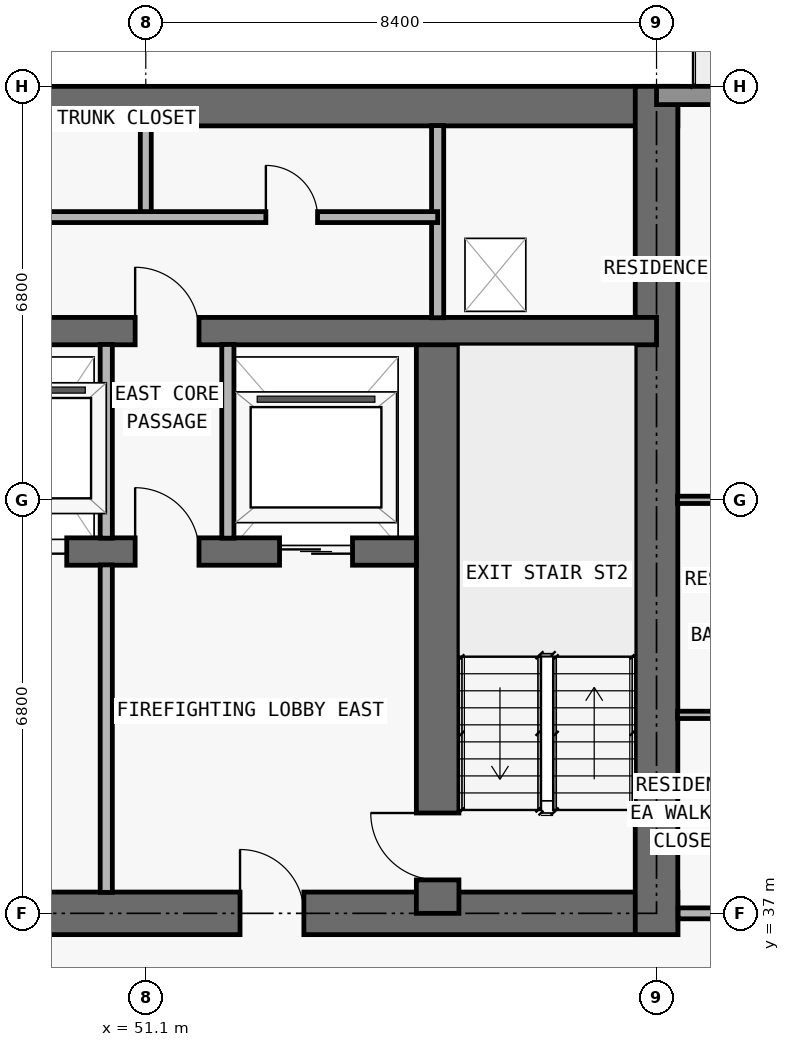
"""IFC4 building model, lengths in metres.
Left out: names, types, materials, properties, quantities, classifications, styles, units other than length and angle.
Written with IfcOpenShell. Run it as: python <this file> out.ifc"""

import sys

from ifc_helpers import new_model, si_unit, direction, frame, frame_2d, origin, place, context, subcontext, project, spatial, rectangle, extrude, element, fill, save


model = new_model("IFC4")
c1 = context("Model", 3, precision=1e-05, world=origin(), true_north=direction((0.0, 1.0)))
c2 = subcontext(c1, "Body", "Model", "MODEL_VIEW")
j1 = project(units=[si_unit("LENGTHUNIT", "METRE"), si_unit("PLANEANGLEUNIT", "RADIAN")], contexts=[c1])
p1 = place(None, origin())
s1 = spatial("IfcSite", under=j1, at=p1, CompositionType="ELEMENT")
p2 = place(p1, origin())
s2 = spatial("IfcBuilding", under=s1, at=p2, CompositionType="ELEMENT")
p3 = place(p2, frame((0.0, 0.0, 188.4)))
s3 = spatial("IfcBuildingStorey", under=s2, at=p3, CompositionType="ELEMENT", Elevation=188.4)
p4 = place(p3, frame((17.95, 37.0, 0.0), z_axis=(0.0, 0.0, 1.0), x_axis=(1.0, 0.0, 0.0)))
e1 = element("IfcWall", 1, at=p4, inside=s3, PredefinedType="SHEAR", context=c2, shape_type="SweptSolid", body=[
    extrude(rectangle(XDim=41.9, YDim=0.7, at=frame_2d((20.95, 0.0))), origin(), (0.0, 0.0, 1.0), 3.05),
])
p5 = place(p4, frame((14.35, 0.0, 0.0)))
e2 = element("IfcOpeningElement", 2, at=p5, cuts=e1, PredefinedType="OPENING", context=c2, shape_type="SweptSolid", body=[
    extrude(rectangle(XDim=1.1, YDim=2.15, at=frame_2d((0.55, 1.075))), frame((0.0, 0.36, 0.0), z_axis=(0.0, -1.0, 0.0), x_axis=(1.0, 0.0, 0.0)), (0.0, 0.0, 1.0), 0.72),
])
p6 = place(p4, frame((6.2, 0.0, 0.0)))
e3 = element("IfcOpeningElement", 3, at=p6, cuts=e1, PredefinedType="OPENING", context=c2, shape_type="SweptSolid", body=[
    extrude(rectangle(XDim=1.05, YDim=2.15, at=frame_2d((0.525, 1.075))), frame((0.0, 0.36, 0.0), z_axis=(0.0, -1.0, 0.0), x_axis=(1.0, 0.0, 0.0)), (0.0, 0.0, 1.0), 0.72),
])
p7 = place(p4, frame((34.7, 0.0, 0.0)))
e4 = element("IfcOpeningElement", 4, at=p7, cuts=e1, PredefinedType="OPENING", context=c2, shape_type="SweptSolid", body=[
    extrude(rectangle(XDim=1.05, YDim=2.15, at=frame_2d((0.525, 1.075))), frame((0.0, 0.36, 0.0), z_axis=(0.0, -1.0, 0.0), x_axis=(1.0, 0.0, 0.0)), (0.0, 0.0, 1.0), 0.72),
])
p8 = place(p4, frame((10.812, 0.0, 0.0)))
e5 = element("IfcOpeningElement", 5, at=p8, cuts=e1, PredefinedType="OPENING", context=c2, shape_type="SweptSolid", body=[
    extrude(rectangle(XDim=1.05, YDim=2.15, at=frame_2d((0.525, 1.075))), frame((0.0, 0.36, 0.0), z_axis=(0.0, -1.0, 0.0), x_axis=(1.0, 0.0, 0.0)), (0.0, 0.0, 1.0), 0.72),
])
p9 = place(p4, frame((24.05, 0.0, 0.0)))
e6 = element("IfcOpeningElement", 6, at=p9, cuts=e1, PredefinedType="OPENING", context=c2, shape_type="SweptSolid", body=[
    extrude(rectangle(XDim=1.05, YDim=2.15, at=frame_2d((0.525, 1.075))), frame((0.0, 0.36, 0.0), z_axis=(0.0, -1.0, 0.0), x_axis=(1.0, 0.0, 0.0)), (0.0, 0.0, 1.0), 0.72),
])
p10 = place(p3, frame((17.95, 50.275, 0.0), z_axis=(0.0, 0.0, 1.0), x_axis=(1.0, 0.0, 0.0)))
e7 = element("IfcWall", 7, at=p10, inside=s3, PredefinedType="SHEAR", context=c2, shape_type="SweptSolid", body=[
    extrude(rectangle(XDim=41.9, YDim=0.65, at=frame_2d((20.95, 0.0))), origin(), (0.0, 0.0, 1.0), 3.05),
])
p11 = place(p3, frame((59.5, 36.65, 0.0), z_axis=(0.0, 0.0, 1.0), x_axis=(0.0, 1.0, 0.0)))
e8 = element("IfcWall", 8, at=p11, inside=s3, PredefinedType="SHEAR", context=c2, shape_type="SweptSolid", body=[
    extrude(rectangle(XDim=13.95, YDim=0.7, at=frame_2d((6.975, 0.0))), origin(), (0.0, 0.0, 1.0), 3.05),
])
p12 = place(p3, frame((55.9, 37.0, 0.0), z_axis=(0.0, 0.0, 1.0), x_axis=(0.0, 1.0, 0.0)))
e9 = element("IfcWall", 9, at=p12, inside=s3, PredefinedType="SHEAR", context=c2, shape_type="SweptSolid", body=[
    extrude(rectangle(XDim=9.575, YDim=0.7, at=frame_2d((4.788, 0.0))), origin(), (0.0, 0.0, 1.0), 3.05),
])
p13 = place(p12, frame((0.55, 0.0, 0.0)))
e10 = element("IfcOpeningElement", 10, at=p13, cuts=e9, PredefinedType="OPENING", context=c2, shape_type="SweptSolid", body=[
    extrude(rectangle(XDim=1.1, YDim=2.15, at=frame_2d((0.55, 1.075))), frame((0.0, 0.36, 0.0), z_axis=(0.0, -1.0, 0.0), x_axis=(1.0, 0.0, 0.0)), (0.0, 0.0, 1.0), 0.72),
])
p14 = place(p3, frame((22.25, 42.95, 0.0), z_axis=(0.0, 0.0, 1.0), x_axis=(1.0, 0.0, 0.0)))
e11 = element("IfcWall", 11, at=p14, inside=s3, PredefinedType="SHEAR", context=c2, shape_type="SweptSolid", body=[
    extrude(rectangle(XDim=33.3, YDim=0.45, at=frame_2d((16.65, 0.0))), origin(), (0.0, 0.0, 1.0), 3.05),
])
p15 = place(p14, frame((1.05, 0.0, 0.0)))
e12 = element("IfcOpeningElement", 12, at=p15, cuts=e11, PredefinedType="OPENING", context=c2, shape_type="SweptSolid", body=[
    extrude(rectangle(XDim=1.2, YDim=2.2, at=frame_2d((0.6, 1.1))), frame((0.0, 0.235, 0.0), z_axis=(0.0, -1.0, 0.0), x_axis=(1.0, 0.0, 0.0)), (0.0, 0.0, 1.0), 0.47),
])
p16 = place(p14, frame((31.05, 0.0, 0.0)))
e13 = element("IfcOpeningElement", 13, at=p16, cuts=e11, PredefinedType="OPENING", context=c2, shape_type="SweptSolid", body=[
    extrude(rectangle(XDim=1.2, YDim=2.2, at=frame_2d((0.6, 1.1))), frame((0.0, 0.235, 0.0), z_axis=(0.0, -1.0, 0.0), x_axis=(1.0, 0.0, 0.0)), (0.0, 0.0, 1.0), 0.47),
])
p17 = place(p14, frame((26.45, 0.0, 0.0)))
e14 = element("IfcOpeningElement", 14, at=p17, cuts=e11, PredefinedType="OPENING", context=c2, shape_type="SweptSolid", body=[
    extrude(rectangle(XDim=1.1, YDim=2.2, at=frame_2d((0.55, 1.1))), frame((0.0, 0.235, 0.0), z_axis=(0.0, -1.0, 0.0), x_axis=(1.0, 0.0, 0.0)), (0.0, 0.0, 1.0), 0.47),
])
p18 = place(p14, frame((5.95, 0.0, 0.0)))
e15 = element("IfcOpeningElement", 15, at=p18, cuts=e11, PredefinedType="OPENING", context=c2, shape_type="SweptSolid", body=[
    extrude(rectangle(XDim=1.1, YDim=2.2, at=frame_2d((0.55, 1.1))), frame((0.0, 0.235, 0.0), z_axis=(0.0, -1.0, 0.0), x_axis=(1.0, 0.0, 0.0)), (0.0, 0.0, 1.0), 0.47),
])
p19 = place(p14, frame((3.625, 0.0, 0.0)))
e16 = element("IfcOpeningElement", 16, at=p19, cuts=e11, PredefinedType="OPENING", context=c2, shape_type="SweptSolid", body=[
    extrude(rectangle(XDim=1.05, YDim=2.15, at=frame_2d((0.525, 1.075))), frame((0.0, 0.235, 0.0), z_axis=(0.0, -1.0, 0.0), x_axis=(1.0, 0.0, 0.0)), (0.0, 0.0, 1.0), 0.47),
])
p20 = place(p14, frame((28.675, 0.0, 0.0)))
e17 = element("IfcOpeningElement", 17, at=p20, cuts=e11, PredefinedType="OPENING", context=c2, shape_type="SweptSolid", body=[
    extrude(rectangle(XDim=1.05, YDim=2.15, at=frame_2d((0.525, 1.075))), frame((0.0, 0.235, 0.0), z_axis=(0.0, -1.0, 0.0), x_axis=(1.0, 0.0, 0.0)), (0.0, 0.0, 1.0), 0.47),
])
p21 = place(p14, frame((15.225, 0.0, 0.0)))
e18 = element("IfcOpeningElement", 18, at=p21, cuts=e11, PredefinedType="OPENING", context=c2, shape_type="SweptSolid", body=[
    extrude(rectangle(XDim=1.0, YDim=2.2, at=frame_2d((0.5, 1.1))), frame((0.0, 0.235, 0.0), z_axis=(0.0, -1.0, 0.0), x_axis=(1.0, 0.0, 0.0)), (0.0, 0.0, 1.0), 0.47),
])
p22 = place(p14, frame((21.975, 0.0, 0.0)))
e19 = element("IfcOpeningElement", 19, at=p22, cuts=e11, PredefinedType="OPENING", context=c2, shape_type="SweptSolid", body=[
    extrude(rectangle(XDim=1.0, YDim=2.2, at=frame_2d((0.5, 1.1))), frame((0.0, 0.235, 0.0), z_axis=(0.0, -1.0, 0.0), x_axis=(1.0, 0.0, 0.0)), (0.0, 0.0, 1.0), 0.47),
])
p23 = place(p3, frame((18.3, 46.575, 0.0), z_axis=(0.0, 0.0, 1.0), x_axis=(1.0, 0.0, 0.0)))
e20 = element("IfcWall", 20, at=p23, inside=s3, PredefinedType="SHEAR", context=c2, shape_type="SweptSolid", body=[
    extrude(rectangle(XDim=41.2, YDim=0.45, at=frame_2d((20.6, 0.0))), origin(), (0.0, 0.0, 1.0), 3.05),
])
p24 = place(p23, frame((7.575, 0.0, 0.0)))
e21 = element("IfcOpeningElement", 21, at=p24, cuts=e20, PredefinedType="OPENING", context=c2, shape_type="SweptSolid", body=[
    extrude(rectangle(XDim=1.05, YDim=2.15, at=frame_2d((0.525, 1.075))), frame((0.0, 0.235, 0.0), z_axis=(0.0, -1.0, 0.0), x_axis=(1.0, 0.0, 0.0)), (0.0, 0.0, 1.0), 0.47),
])
p25 = place(p23, frame((32.625, 0.0, 0.0)))
e22 = element("IfcOpeningElement", 22, at=p25, cuts=e20, PredefinedType="OPENING", context=c2, shape_type="SweptSolid", body=[
    extrude(rectangle(XDim=1.05, YDim=2.15, at=frame_2d((0.525, 1.075))), frame((0.0, 0.235, 0.0), z_axis=(0.0, -1.0, 0.0), x_axis=(1.0, 0.0, 0.0)), (0.0, 0.0, 1.0), 0.47),
])
p26 = place(p3, frame((59.5, 50.45, 0.0), z_axis=(0.0, 0.0, 1.0), x_axis=(1.0, 0.0, 0.0)))
e23 = element("IfcWall", 23, at=p26, inside=s3, PredefinedType="STANDARD", context=c2, shape_type="SweptSolid", body=[
    extrude(rectangle(XDim=8.2, YDim=0.3, at=frame_2d((4.1, 0.0))), origin(), (0.0, 0.0, 1.0), 3.05),
])
p27 = place(p26, frame((3.1, 0.0, 0.0)))
e24 = element("IfcOpeningElement", 24, at=p27, cuts=e23, PredefinedType="OPENING", context=c2, shape_type="SweptSolid", body=[
    extrude(rectangle(XDim=2.0, YDim=2.3, at=frame_2d((1.0, 1.15))), frame((0.0, 0.16, 0.0), z_axis=(0.0, -1.0, 0.0), x_axis=(1.0, 0.0, 0.0)), (0.0, 0.0, 1.0), 0.32),
])
p28 = place(p3, frame((50.45, 37.345, 0.0), z_axis=(0.0, 0.0, 1.0), x_axis=(0.0, 1.0, 0.0)))
e25 = element("IfcWall", 25, at=p28, inside=s3, PredefinedType="PARTITIONING", context=c2, shape_type="SweptSolid", body=[
    extrude(rectangle(XDim=5.385, YDim=0.2, at=frame_2d((2.692, 0.0))), origin(), (0.0, 0.0, 1.0), 3.05),
])
p29 = place(p3, frame((50.45, 43.17, 0.0), z_axis=(0.0, 0.0, 1.0), x_axis=(0.0, 1.0, 0.0)))
e26 = element("IfcWall", 26, at=p29, inside=s3, PredefinedType="PARTITIONING", context=c2, shape_type="SweptSolid", body=[
    extrude(rectangle(XDim=3.185, YDim=0.2, at=frame_2d((1.593, 0.0))), origin(), (0.0, 0.0, 1.0), 3.05),
])
p30 = place(p3, frame((51.1, 48.45, 0.0), z_axis=(0.0, 0.0, 1.0), x_axis=(0.0, 1.0, 0.0)))
e27 = element("IfcWall", 27, at=p30, inside=s3, PredefinedType="PARTITIONING", context=c2, shape_type="SweptSolid", body=[
    extrude(rectangle(XDim=1.505, YDim=0.18, at=frame_2d((0.752, 0.0))), origin(), (0.0, 0.0, 1.0), 3.05),
])
p31 = place(p3, frame((52.45, 43.17, 0.0), z_axis=(0.0, 0.0, 1.0), x_axis=(0.0, 1.0, 0.0)))
e28 = element("IfcWall", 28, at=p31, inside=s3, PredefinedType="PARTITIONING", context=c2, shape_type="SweptSolid", body=[
    extrude(rectangle(XDim=3.185, YDim=0.2, at=frame_2d((1.593, 0.0))), origin(), (0.0, 0.0, 1.0), 3.05),
])
p32 = place(p3, frame((55.9, 46.795, 0.0), z_axis=(0.0, 0.0, 1.0), x_axis=(0.0, 1.0, 0.0)))
e29 = element("IfcWall", 29, at=p32, inside=s3, PredefinedType="PARTITIONING", context=c2, shape_type="SweptSolid", body=[
    extrude(rectangle(XDim=3.16, YDim=0.2, at=frame_2d((1.58, 0.0))), origin(), (0.0, 0.0, 1.0), 3.05),
])
p33 = place(p3, frame((59.855, 37.0, 0.0), z_axis=(0.0, 0.0, 1.0), x_axis=(1.0, 0.0, 0.0)))
e30 = element("IfcWall", 30, at=p33, inside=s3, PredefinedType="PARTITIONING", context=c2, shape_type="SweptSolid", body=[
    extrude(rectangle(XDim=7.845, YDim=0.18, at=frame_2d((3.922, 0.0))), origin(), (0.0, 0.0, 1.0), 3.05),
])
p34 = place(p33, frame((3.349, 0.0, 0.0)))
e31 = element("IfcOpeningElement", 31, at=p34, cuts=e30, PredefinedType="OPENING", context=c2, shape_type="SweptSolid", body=[
    extrude(rectangle(XDim=1.0, YDim=2.2, at=frame_2d((0.5, 1.1))), frame((0.0, 0.1, 0.0), z_axis=(0.0, -1.0, 0.0), x_axis=(1.0, 0.0, 0.0)), (0.0, 0.0, 1.0), 0.2),
])
p35 = place(p3, frame((59.845, 40.264, 0.0), z_axis=(0.0, 0.0, 1.0), x_axis=(1.0, 0.0, 0.0)))
e32 = element("IfcWall", 32, at=p35, inside=s3, PredefinedType="PARTITIONING", context=c2, shape_type="SweptSolid", body=[
    extrude(rectangle(XDim=2.305, YDim=0.12, at=frame_2d((1.152, 0.0))), origin(), (0.0, 0.0, 1.0), 3.05),
])
p36 = place(p3, frame((59.845, 43.8, 0.0), z_axis=(0.0, 0.0, 1.0), x_axis=(1.0, 0.0, 0.0)))
e33 = element("IfcWall", 33, at=p36, inside=s3, PredefinedType="PARTITIONING", context=c2, shape_type="SweptSolid", body=[
    extrude(rectangle(XDim=11.56, YDim=0.12, at=frame_2d((5.78, 0.0))), origin(), (0.0, 0.0, 1.0), 2.418),
])
p37 = place(p36, frame((3.409, 0.0, 0.0)))
e34 = element("IfcOpeningElement", 34, at=p37, cuts=e33, PredefinedType="OPENING", context=c2, shape_type="SweptSolid", body=[
    extrude(rectangle(XDim=0.9, YDim=2.15, at=frame_2d((0.45, 1.075))), frame((0.0, 0.07, 0.0), z_axis=(0.0, -1.0, 0.0), x_axis=(1.0, 0.0, 0.0)), (0.0, 0.0, 1.0), 0.14),
])
p38 = place(p36, frame((0.728, 0.0, 0.0)))
e35 = element("IfcOpeningElement", 35, at=p38, cuts=e33, PredefinedType="OPENING", context=c2, shape_type="SweptSolid", body=[
    extrude(rectangle(XDim=0.85, YDim=2.1, at=frame_2d((0.425, 1.05))), frame((0.0, 0.07, 0.0), z_axis=(0.0, -1.0, 0.0), x_axis=(1.0, 0.0, 0.0)), (0.0, 0.0, 1.0), 0.14),
])
p39 = place(p3, frame((31.4, 48.45, 0.0), z_axis=(0.0, 0.0, 1.0), x_axis=(1.0, 0.0, 0.0)))
e36 = element("IfcWall", 36, at=p39, inside=s3, PredefinedType="PARTITIONING", context=c2, shape_type="SweptSolid", body=[
    extrude(rectangle(XDim=24.5, YDim=0.18, at=frame_2d((12.25, 0.0))), origin(), (0.0, 0.0, 1.0), 3.05),
])
p40 = place(p39, frame((1.775, 0.0, 0.0)))
e37 = element("IfcOpeningElement", 37, at=p40, cuts=e36, PredefinedType="OPENING", context=c2, shape_type="SweptSolid", body=[
    extrude(rectangle(XDim=1.2, YDim=2.2, at=frame_2d((0.6, 1.1))), frame((0.0, 0.1, 0.0), z_axis=(0.0, -1.0, 0.0), x_axis=(1.0, 0.0, 0.0)), (0.0, 0.0, 1.0), 0.2),
])
p41 = place(p39, frame((9.35, 0.0, 0.0)))
e38 = element("IfcOpeningElement", 38, at=p41, cuts=e36, PredefinedType="OPENING", context=c2, shape_type="SweptSolid", body=[
    extrude(rectangle(XDim=1.0, YDim=2.2, at=frame_2d((0.5, 1.1))), frame((0.0, 0.1, 0.0), z_axis=(0.0, -1.0, 0.0), x_axis=(1.0, 0.0, 0.0)), (0.0, 0.0, 1.0), 0.2),
])
p42 = place(p39, frame((16.725, 0.0, 0.0)))
e39 = element("IfcOpeningElement", 39, at=p42, cuts=e36, PredefinedType="OPENING", context=c2, shape_type="SweptSolid", body=[
    extrude(rectangle(XDim=1.2, YDim=2.2, at=frame_2d((0.6, 1.1))), frame((0.0, 0.1, 0.0), z_axis=(0.0, -1.0, 0.0), x_axis=(1.0, 0.0, 0.0)), (0.0, 0.0, 1.0), 0.2),
])
p43 = place(p39, frame((21.675, 0.0, 0.0)))
e40 = element("IfcOpeningElement", 40, at=p43, cuts=e36, PredefinedType="OPENING", context=c2, shape_type="SweptSolid", body=[
    extrude(rectangle(XDim=0.85, YDim=2.1, at=frame_2d((0.425, 1.05))), frame((0.0, 0.1, 0.0), z_axis=(0.0, -1.0, 0.0), x_axis=(1.0, 0.0, 0.0)), (0.0, 0.0, 1.0), 0.2),
])
p44 = place(p16, origin())
e41 = element("IfcDoor", 41, at=p44, inside=s3, OperationType="DOUBLE_DOOR_SLIDING", PredefinedType="DOOR", context=c2, shape_type="SweptSolid", body=[
    extrude(rectangle(XDim=1.2, YDim=2.2, at=frame_2d((0.6, 1.1))), frame((0.0, 0.025, 0.0), z_axis=(0.0, -1.0, 0.0), x_axis=(1.0, 0.0, 0.0)), (0.0, 0.0, 1.0), 0.05),
])
fill(e13, e41)
p45 = place(p17, origin())
e42 = element("IfcDoor", 42, at=p45, inside=s3, OperationType="DOUBLE_DOOR_SLIDING", PredefinedType="DOOR", context=c2, shape_type="SweptSolid", body=[
    extrude(rectangle(XDim=1.1, YDim=2.2, at=frame_2d((0.55, 1.1))), frame((0.0, 0.025, 0.0), z_axis=(0.0, -1.0, 0.0), x_axis=(1.0, 0.0, 0.0)), (0.0, 0.0, 1.0), 0.05),
])
fill(e14, e42)
p46 = place(p7, origin())
e43 = element("IfcDoor", 43, at=p46, inside=s3, OperationType="SINGLE_SWING_LEFT", PredefinedType="DOOR", context=c2, shape_type="SweptSolid", body=[
    extrude(rectangle(XDim=1.05, YDim=2.15, at=frame_2d((0.525, 1.075))), frame((0.0, 0.025, 0.0), z_axis=(0.0, -1.0, 0.0), x_axis=(1.0, 0.0, 0.0)), (0.0, 0.0, 1.0), 0.05),
])
fill(e4, e43)
p47 = place(p13, origin())
e44 = element("IfcDoor", 44, at=p47, inside=s3, OperationType="SINGLE_SWING_RIGHT", PredefinedType="DOOR", context=c2, shape_type="SweptSolid", body=[
    extrude(rectangle(XDim=1.1, YDim=2.15, at=frame_2d((0.55, 1.075))), frame((0.0, 0.025, 0.0), z_axis=(0.0, -1.0, 0.0), x_axis=(1.0, 0.0, 0.0)), (0.0, 0.0, 1.0), 0.05),
])
fill(e10, e44)
p48 = place(p20, origin())
e45 = element("IfcDoor", 45, at=p48, inside=s3, OperationType="SINGLE_SWING_LEFT", PredefinedType="DOOR", context=c2, shape_type="SweptSolid", body=[
    extrude(rectangle(XDim=1.05, YDim=2.15, at=frame_2d((0.525, 1.075))), frame((0.0, 0.025, 0.0), z_axis=(0.0, -1.0, 0.0), x_axis=(1.0, 0.0, 0.0)), (0.0, 0.0, 1.0), 0.05),
])
fill(e17, e45)
p49 = place(p25, origin())
e46 = element("IfcDoor", 46, at=p49, inside=s3, OperationType="SINGLE_SWING_LEFT", PredefinedType="DOOR", context=c2, shape_type="SweptSolid", body=[
    extrude(rectangle(XDim=1.05, YDim=2.15, at=frame_2d((0.525, 1.075))), frame((0.0, 0.025, 0.0), z_axis=(0.0, -1.0, 0.0), x_axis=(1.0, 0.0, 0.0)), (0.0, 0.0, 1.0), 0.05),
])
fill(e22, e46)
p50 = place(p43, origin())
e47 = element("IfcDoor", 47, at=p50, inside=s3, OperationType="SINGLE_SWING_LEFT", PredefinedType="DOOR", context=c2, shape_type="SweptSolid", body=[
    extrude(rectangle(XDim=0.85, YDim=2.1, at=frame_2d((0.425, 1.05))), frame((0.0, 0.025, 0.0), z_axis=(0.0, -1.0, 0.0), x_axis=(1.0, 0.0, 0.0)), (0.0, 0.0, 1.0), 0.05),
])
fill(e40, e47)
save(model, sys.argv[1])
